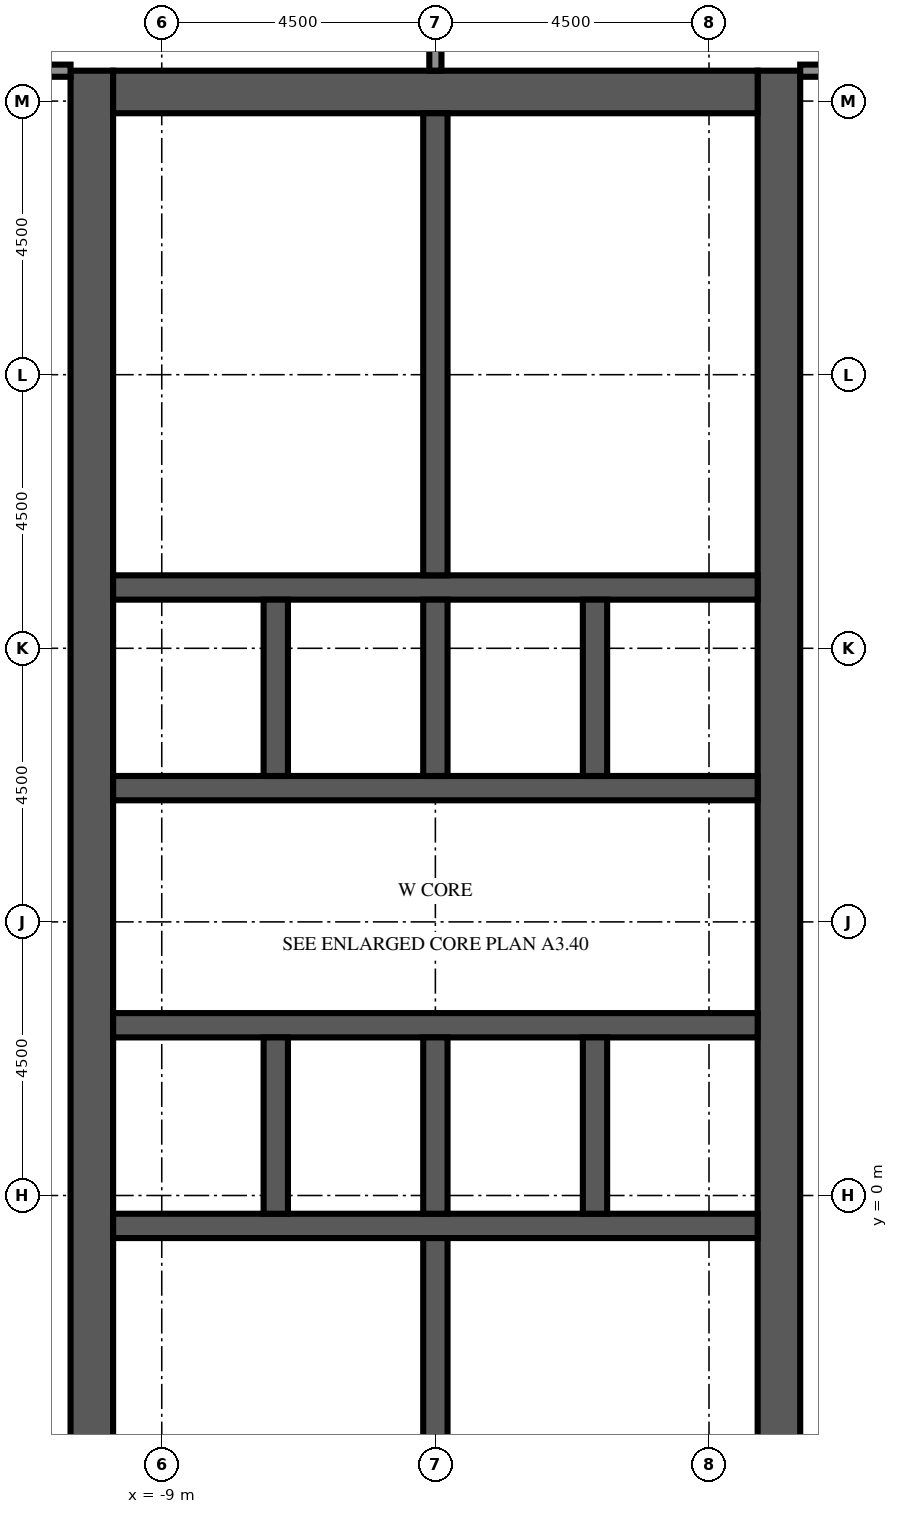
"""IFC4 building model, lengths in metres.
Left out: names, types, materials, properties, quantities, classifications, styles, units other than length and angle.
Written with IfcOpenShell. Run it as: python <this file> out.ifc"""

import sys

from ifc_helpers import new_model, si_unit, direction, frame, frame_2d, origin, place, context, subcontext, project, spatial, rectangle, extrude, element, fill, save


model = new_model("IFC4")
c1 = context("Model", 3, precision=1e-05, world=origin(), true_north=direction((0.0, 1.0)))
c2 = subcontext(c1, "Body", "Model", "MODEL_VIEW")
j1 = project(units=[si_unit("LENGTHUNIT", "METRE"), si_unit("PLANEANGLEUNIT", "RADIAN")], contexts=[c1])
p1 = place(None, origin())
s1 = spatial("IfcSite", under=j1, at=p1, CompositionType="ELEMENT")
p2 = place(p1, origin())
s2 = spatial("IfcBuilding", under=s1, at=p2, CompositionType="ELEMENT")
p3 = place(p2, frame((0.0, 0.0, 278.6)))
s3 = spatial("IfcBuildingStorey", under=s2, at=p3, CompositionType="ELEMENT", Elevation=278.6)
p4 = place(p3, frame((-10.15, -9.0, 0.0), z_axis=(0.0, 0.0, 1.0), x_axis=(0.0, 1.0, 0.0)))
e1 = element("IfcWall", 1, at=p4, inside=s3, PredefinedType="SHEAR", context=c2, shape_type="SweptSolid", body=[
    extrude(rectangle(XDim=27.5, YDim=0.7, at=frame_2d((13.75, 0.0))), origin(), (0.0, 0.0, 1.0), 4.1),
])
p5 = place(p4, frame((12.55, 0.0, 0.0)))
e2 = element("IfcOpeningElement", 2, at=p5, cuts=e1, PredefinedType="OPENING", context=c2, shape_type="SweptSolid", body=[
    extrude(rectangle(XDim=2.4, YDim=2.4, at=frame_2d((1.2, 1.2))), frame((0.0, 0.36, 0.0), z_axis=(0.0, -1.0, 0.0), x_axis=(1.0, 0.0, 0.0)), (0.0, 0.0, 1.0), 0.72),
])
p6 = place(p4, frame((6.825, 0.0, 0.0)))
e3 = element("IfcOpeningElement", 3, at=p6, cuts=e1, PredefinedType="OPENING", context=c2, shape_type="SweptSolid", body=[
    extrude(rectangle(XDim=1.2, YDim=2.1, at=frame_2d((0.6, 1.05))), frame((0.0, 0.36, 0.0), z_axis=(0.0, -1.0, 0.0), x_axis=(1.0, 0.0, 0.0)), (0.0, 0.0, 1.0), 0.72),
])
p7 = place(p4, frame((19.475, 0.0, 0.0)))
e4 = element("IfcOpeningElement", 4, at=p7, cuts=e1, PredefinedType="OPENING", context=c2, shape_type="SweptSolid", body=[
    extrude(rectangle(XDim=1.2, YDim=2.1, at=frame_2d((0.6, 1.05))), frame((0.0, 0.36, 0.0), z_axis=(0.0, -1.0, 0.0), x_axis=(1.0, 0.0, 0.0)), (0.0, 0.0, 1.0), 0.72),
])
p8 = place(p3, frame((1.15, -9.0, 0.0), z_axis=(0.0, 0.0, 1.0), x_axis=(0.0, 1.0, 0.0)))
e5 = element("IfcWall", 5, at=p8, inside=s3, PredefinedType="SHEAR", context=c2, shape_type="SweptSolid", body=[
    extrude(rectangle(XDim=27.5, YDim=0.7, at=frame_2d((13.75, 0.0))), origin(), (0.0, 0.0, 1.0), 4.1),
])
p9 = place(p8, frame((12.55, 0.0, 0.0)))
e6 = element("IfcOpeningElement", 6, at=p9, cuts=e5, PredefinedType="OPENING", context=c2, shape_type="SweptSolid", body=[
    extrude(rectangle(XDim=2.4, YDim=2.4, at=frame_2d((1.2, 1.2))), frame((0.0, 0.36, 0.0), z_axis=(0.0, -1.0, 0.0), x_axis=(1.0, 0.0, 0.0)), (0.0, 0.0, 1.0), 0.72),
])
p10 = place(p8, frame((3.9, 0.0, 0.0)))
e7 = element("IfcOpeningElement", 7, at=p10, cuts=e5, PredefinedType="OPENING", context=c2, shape_type="SweptSolid", body=[
    extrude(rectangle(XDim=1.2, YDim=2.1, at=frame_2d((0.6, 1.05))), frame((0.0, 0.36, 0.0), z_axis=(0.0, -1.0, 0.0), x_axis=(1.0, 0.0, 0.0)), (0.0, 0.0, 1.0), 0.72),
])
p11 = place(p8, frame((19.46, 0.0, 0.0)))
e8 = element("IfcOpeningElement", 8, at=p11, cuts=e5, PredefinedType="OPENING", context=c2, shape_type="SweptSolid", body=[
    extrude(rectangle(XDim=1.0, YDim=2.1, at=frame_2d((0.5, 1.05))), frame((0.0, 0.36, 0.0), z_axis=(0.0, -1.0, 0.0), x_axis=(1.0, 0.0, 0.0)), (0.0, 0.0, 1.0), 0.72),
])
p12 = place(p8, frame((21.17, 0.0, 0.0)))
e9 = element("IfcOpeningElement", 9, at=p12, cuts=e5, PredefinedType="OPENING", context=c2, shape_type="SweptSolid", body=[
    extrude(rectangle(XDim=1.0, YDim=2.1, at=frame_2d((0.5, 1.05))), frame((0.0, 0.36, 0.0), z_axis=(0.0, -1.0, 0.0), x_axis=(1.0, 0.0, 0.0)), (0.0, 0.0, 1.0), 0.72),
])
p13 = place(p8, frame((23.26, 0.0, 0.0)))
e10 = element("IfcOpeningElement", 10, at=p13, cuts=e5, PredefinedType="OPENING", context=c2, shape_type="SweptSolid", body=[
    extrude(rectangle(XDim=1.0, YDim=2.1, at=frame_2d((0.5, 1.05))), frame((0.0, 0.36, 0.0), z_axis=(0.0, -1.0, 0.0), x_axis=(1.0, 0.0, 0.0)), (0.0, 0.0, 1.0), 0.72),
])
p14 = place(p8, frame((25.35, 0.0, 0.0)))
e11 = element("IfcOpeningElement", 11, at=p14, cuts=e5, PredefinedType="OPENING", context=c2, shape_type="SweptSolid", body=[
    extrude(rectangle(XDim=1.0, YDim=2.1, at=frame_2d((0.5, 1.05))), frame((0.0, 0.36, 0.0), z_axis=(0.0, -1.0, 0.0), x_axis=(1.0, 0.0, 0.0)), (0.0, 0.0, 1.0), 0.72),
])
p15 = place(p3, frame((-9.8, 18.15, 0.0), z_axis=(0.0, 0.0, 1.0), x_axis=(1.0, 0.0, 0.0)))
e12 = element("IfcWall", 12, at=p15, inside=s3, PredefinedType="SHEAR", context=c2, shape_type="SweptSolid", body=[
    extrude(rectangle(XDim=10.6, YDim=0.7, at=frame_2d((5.3, 0.0))), origin(), (0.0, 0.0, 1.0), 4.1),
])
p16 = place(p3, frame((-9.8, -0.5, 0.0), z_axis=(0.0, 0.0, 1.0), x_axis=(1.0, 0.0, 0.0)))
e13 = element("IfcWall", 13, at=p16, inside=s3, PredefinedType="SHEAR", context=c2, shape_type="SweptSolid", body=[
    extrude(rectangle(XDim=10.6, YDim=0.4, at=frame_2d((5.3, 0.0))), origin(), (0.0, 0.0, 1.0), 4.1),
])
p17 = place(p3, frame((-9.8, 2.8, 0.0), z_axis=(0.0, 0.0, 1.0), x_axis=(1.0, 0.0, 0.0)))
e14 = element("IfcWall", 14, at=p17, inside=s3, PredefinedType="SHEAR", context=c2, shape_type="SweptSolid", body=[
    extrude(rectangle(XDim=10.6, YDim=0.4, at=frame_2d((5.3, 0.0))), origin(), (0.0, 0.0, 1.0), 4.1),
])
p18 = place(p17, frame((0.688, 0.0, 0.0)))
e15 = element("IfcOpeningElement", 15, at=p18, cuts=e14, PredefinedType="OPENING", context=c2, shape_type="SweptSolid", body=[
    extrude(rectangle(XDim=1.1, YDim=2.1, at=frame_2d((0.55, 1.05))), frame((0.0, 0.21, 0.0), z_axis=(0.0, -1.0, 0.0), x_axis=(1.0, 0.0, 0.0)), (0.0, 0.0, 1.0), 0.42),
])
p19 = place(p17, frame((3.438, 0.0, 0.0)))
e16 = element("IfcOpeningElement", 16, at=p19, cuts=e14, PredefinedType="OPENING", context=c2, shape_type="SweptSolid", body=[
    extrude(rectangle(XDim=1.1, YDim=2.1, at=frame_2d((0.55, 1.05))), frame((0.0, 0.21, 0.0), z_axis=(0.0, -1.0, 0.0), x_axis=(1.0, 0.0, 0.0)), (0.0, 0.0, 1.0), 0.42),
])
p20 = place(p17, frame((6.113, 0.0, 0.0)))
e17 = element("IfcOpeningElement", 17, at=p20, cuts=e14, PredefinedType="OPENING", context=c2, shape_type="SweptSolid", body=[
    extrude(rectangle(XDim=1.0, YDim=2.1, at=frame_2d((0.5, 1.05))), frame((0.0, 0.21, 0.0), z_axis=(0.0, -1.0, 0.0), x_axis=(1.0, 0.0, 0.0)), (0.0, 0.0, 1.0), 0.42),
])
p21 = place(p17, frame((8.863, 0.0, 0.0)))
e18 = element("IfcOpeningElement", 18, at=p21, cuts=e14, PredefinedType="OPENING", context=c2, shape_type="SweptSolid", body=[
    extrude(rectangle(XDim=1.0, YDim=2.1, at=frame_2d((0.5, 1.05))), frame((0.0, 0.21, 0.0), z_axis=(0.0, -1.0, 0.0), x_axis=(1.0, 0.0, 0.0)), (0.0, 0.0, 1.0), 0.42),
])
p22 = place(p3, frame((-9.8, 6.7, 0.0), z_axis=(0.0, 0.0, 1.0), x_axis=(1.0, 0.0, 0.0)))
e19 = element("IfcWall", 19, at=p22, inside=s3, PredefinedType="SHEAR", context=c2, shape_type="SweptSolid", body=[
    extrude(rectangle(XDim=10.6, YDim=0.4, at=frame_2d((5.3, 0.0))), origin(), (0.0, 0.0, 1.0), 4.1),
])
p23 = place(p22, frame((3.438, 0.0, 0.0)))
e20 = element("IfcOpeningElement", 20, at=p23, cuts=e19, PredefinedType="OPENING", context=c2, shape_type="SweptSolid", body=[
    extrude(rectangle(XDim=1.1, YDim=2.1, at=frame_2d((0.55, 1.05))), frame((0.0, 0.21, 0.0), z_axis=(0.0, -1.0, 0.0), x_axis=(1.0, 0.0, 0.0)), (0.0, 0.0, 1.0), 0.42),
])
p24 = place(p22, frame((6.062, 0.0, 0.0)))
e21 = element("IfcOpeningElement", 21, at=p24, cuts=e19, PredefinedType="OPENING", context=c2, shape_type="SweptSolid", body=[
    extrude(rectangle(XDim=1.1, YDim=2.1, at=frame_2d((0.55, 1.05))), frame((0.0, 0.21, 0.0), z_axis=(0.0, -1.0, 0.0), x_axis=(1.0, 0.0, 0.0)), (0.0, 0.0, 1.0), 0.42),
])
p25 = place(p22, frame((8.812, 0.0, 0.0)))
e22 = element("IfcOpeningElement", 22, at=p25, cuts=e19, PredefinedType="OPENING", context=c2, shape_type="SweptSolid", body=[
    extrude(rectangle(XDim=1.1, YDim=2.1, at=frame_2d((0.55, 1.05))), frame((0.0, 0.21, 0.0), z_axis=(0.0, -1.0, 0.0), x_axis=(1.0, 0.0, 0.0)), (0.0, 0.0, 1.0), 0.42),
])
p26 = place(p22, frame((0.738, 0.0, 0.0)))
e23 = element("IfcOpeningElement", 23, at=p26, cuts=e19, PredefinedType="OPENING", context=c2, shape_type="SweptSolid", body=[
    extrude(rectangle(XDim=1.0, YDim=2.1, at=frame_2d((0.5, 1.05))), frame((0.0, 0.21, 0.0), z_axis=(0.0, -1.0, 0.0), x_axis=(1.0, 0.0, 0.0)), (0.0, 0.0, 1.0), 0.42),
])
p27 = place(p3, frame((-9.8, 10.0, 0.0), z_axis=(0.0, 0.0, 1.0), x_axis=(1.0, 0.0, 0.0)))
e24 = element("IfcWall", 24, at=p27, inside=s3, PredefinedType="SHEAR", context=c2, shape_type="SweptSolid", body=[
    extrude(rectangle(XDim=10.6, YDim=0.4, at=frame_2d((5.3, 0.0))), origin(), (0.0, 0.0, 1.0), 4.1),
])
for number, where, z_axis, x_axis in (
    (25, (-7.125, -0.3, 0.0), (0.0, 0.0, 1.0), (0.0, 1.0, 0.0)),
    (26, (-7.125, 6.9, 0.0), (0.0, 0.0, 1.0), (0.0, 1.0, 0.0)),
    (27, (-4.5, -0.3, 0.0), (0.0, 0.0, 1.0), (0.0, 1.0, 0.0)),
    (28, (-4.5, 6.9, 0.0), (0.0, 0.0, 1.0), (0.0, 1.0, 0.0)),
    (29, (-1.875, -0.3, 0.0), (0.0, 0.0, 1.0), (0.0, 1.0, 0.0)),
    (30, (-1.875, 6.9, 0.0), (0.0, 0.0, 1.0), (0.0, 1.0, 0.0)),
):
    element("IfcWall", number, at=place(p3, frame(where, z_axis=z_axis, x_axis=x_axis)), inside=s3, PredefinedType="SHEAR", context=c2, shape_type="SweptSolid", body=[
        extrude(rectangle(XDim=2.9, YDim=0.4, at=frame_2d((1.45, 0.0))), origin(), (0.0, 0.0, 1.0), 4.1),
    ])
for number, where, z_axis, x_axis in (
    (31, (-4.5, -8.3, 0.0), (0.0, 0.0, 1.0), (0.0, 1.0, 0.0)),
    (32, (-4.5, 10.2, 0.0), (0.0, 0.0, 1.0), (0.0, 1.0, 0.0)),
):
    element("IfcWall", number, at=place(p3, frame(where, z_axis=z_axis, x_axis=x_axis)), inside=s3, PredefinedType="SHEAR", context=c2, shape_type="SweptSolid", body=[
        extrude(rectangle(XDim=7.6, YDim=0.4, at=frame_2d((3.8, 0.0))), origin(), (0.0, 0.0, 1.0), 4.1),
    ])
p28 = place(p3, frame((-0.8, -2.98, 0.0), z_axis=(0.0, 0.0, 1.0), x_axis=(1.0, 0.0, 0.0)))
e33 = element("IfcWall", 33, at=p28, inside=s3, PredefinedType="PARTITIONING", context=c2, shape_type="SweptSolid", body=[
    extrude(rectangle(XDim=1.6, YDim=0.1, at=frame_2d((0.8, 0.0))), origin(), (0.0, 0.0, 1.0), 3.65),
])
p29 = place(p28, frame((0.3, 0.0, 0.0)))
e34 = element("IfcOpeningElement", 34, at=p29, cuts=e33, PredefinedType="OPENING", context=c2, shape_type="SweptSolid", body=[
    extrude(rectangle(XDim=1.0, YDim=2.1, at=frame_2d((0.5, 1.05))), frame((0.0, 0.06, 0.0), z_axis=(0.0, -1.0, 0.0), x_axis=(1.0, 0.0, 0.0)), (0.0, 0.0, 1.0), 0.12),
])
p30 = place(p3, frame((-0.8, -6.02, 0.0), z_axis=(0.0, 0.0, 1.0), x_axis=(0.0, 1.0, 0.0)))
e35 = element("IfcWall", 35, at=p30, inside=s3, PredefinedType="PARTITIONING", context=c2, shape_type="SweptSolid", body=[
    extrude(rectangle(XDim=3.04, YDim=0.1, at=frame_2d((1.52, 0.0))), origin(), (0.0, 0.0, 1.0), 3.65),
])
p31 = place(p30, frame((1.02, 0.0, 0.0)))
e36 = element("IfcOpeningElement", 36, at=p31, cuts=e35, PredefinedType="OPENING", context=c2, shape_type="SweptSolid", body=[
    extrude(rectangle(XDim=1.0, YDim=2.1, at=frame_2d((0.5, 1.05))), frame((0.0, 0.06, 0.0), z_axis=(0.0, -1.0, 0.0), x_axis=(1.0, 0.0, 0.0)), (0.0, 0.0, 1.0), 0.12),
])
p32 = place(p3, frame((-4.3, -2.98, 0.0), z_axis=(0.0, 0.0, 1.0), x_axis=(1.0, 0.0, 0.0)))
e37 = element("IfcWall", 37, at=p32, inside=s3, PredefinedType="PARTITIONING", context=c2, shape_type="SweptSolid", body=[
    extrude(rectangle(XDim=3.5, YDim=0.1, at=frame_2d((1.75, 0.0))), origin(), (0.0, 0.0, 1.0), 3.65),
])
for number, where, z_axis, x_axis in (
    (38, (-4.3, 11.72, 0.0), (0.0, 0.0, 1.0), (1.0, 0.0, 0.0)),
    (39, (-4.3, 13.62, 0.0), (0.0, 0.0, 1.0), (1.0, 0.0, 0.0)),
    (40, (-4.3, 15.9, 0.0), (0.0, 0.0, 1.0), (1.0, 0.0, 0.0)),
):
    element("IfcWall", number, at=place(p3, frame(where, z_axis=z_axis, x_axis=x_axis)), inside=s3, PredefinedType="PARTITIONING", context=c2, shape_type="SweptSolid", body=[
        extrude(rectangle(XDim=5.1, YDim=0.1, at=frame_2d((2.55, 0.0))), origin(), (0.0, 0.0, 1.0), 3.65),
    ])
p33 = place(p3, frame((-4.5, 18.5, 0.0), z_axis=(0.0, 0.0, 1.0), x_axis=(0.0, 1.0, 0.0)))
e41 = element("IfcWall", 41, at=p33, inside=s3, PredefinedType="PARTITIONING", context=c2, shape_type="SweptSolid", body=[
    extrude(rectangle(XDim=8.1, YDim=0.2, at=frame_2d((4.05, 0.0))), origin(), (0.0, 0.0, 1.0), 3.65),
])
p34 = place(p3, frame((-13.5, 18.5, 0.0), z_axis=(0.0, 0.0, 1.0), x_axis=(1.0, 0.0, 0.0)))
e42 = element("IfcWall", 42, at=p34, inside=s3, PredefinedType="PARTITIONING", context=c2, shape_type="SweptSolid", body=[
    extrude(rectangle(XDim=3.0, YDim=0.2, at=frame_2d((1.5, 0.0))), origin(), (0.0, 0.0, 1.0), 3.65),
])
p35 = place(p34, frame((0.85, 0.0, 0.0)))
e43 = element("IfcOpeningElement", 43, at=p35, cuts=e42, PredefinedType="OPENING", context=c2, shape_type="SweptSolid", body=[
    extrude(rectangle(XDim=1.0, YDim=2.1, at=frame_2d((0.5, 1.05))), frame((0.0, 0.11, 0.0), z_axis=(0.0, -1.0, 0.0), x_axis=(1.0, 0.0, 0.0)), (0.0, 0.0, 1.0), 0.22),
])
p36 = place(p3, frame((1.5, 18.5, 0.0), z_axis=(0.0, 0.0, 1.0), x_axis=(1.0, 0.0, 0.0)))
e44 = element("IfcWall", 44, at=p36, inside=s3, PredefinedType="PARTITIONING", context=c2, shape_type="SweptSolid", body=[
    extrude(rectangle(XDim=4.5, YDim=0.2, at=frame_2d((2.25, 0.0))), origin(), (0.0, 0.0, 1.0), 3.65),
])
p37 = place(p36, frame((1.1, 0.0, 0.0)))
e45 = element("IfcOpeningElement", 45, at=p37, cuts=e44, PredefinedType="OPENING", context=c2, shape_type="SweptSolid", body=[
    extrude(rectangle(XDim=1.0, YDim=2.1, at=frame_2d((0.5, 1.05))), frame((0.0, 0.11, 0.0), z_axis=(0.0, -1.0, 0.0), x_axis=(1.0, 0.0, 0.0)), (0.0, 0.0, 1.0), 0.22),
])
p38 = place(p18, origin())
e46 = element("IfcDoor", 46, at=p38, inside=s3, OperationType="DOUBLE_DOOR_SLIDING", PredefinedType="DOOR", context=c2, shape_type="SweptSolid", body=[
    extrude(rectangle(XDim=1.1, YDim=2.1, at=frame_2d((0.55, 1.05))), frame((0.0, 0.025, 0.0), z_axis=(0.0, -1.0, 0.0), x_axis=(1.0, 0.0, 0.0)), (0.0, 0.0, 1.0), 0.05),
])
fill(e15, e46)
p39 = place(p19, origin())
e47 = element("IfcDoor", 47, at=p39, inside=s3, OperationType="DOUBLE_DOOR_SLIDING", PredefinedType="DOOR", context=c2, shape_type="SweptSolid", body=[
    extrude(rectangle(XDim=1.1, YDim=2.1, at=frame_2d((0.55, 1.05))), frame((0.0, 0.025, 0.0), z_axis=(0.0, -1.0, 0.0), x_axis=(1.0, 0.0, 0.0)), (0.0, 0.0, 1.0), 0.05),
])
fill(e16, e47)
p40 = place(p23, origin())
e48 = element("IfcDoor", 48, at=p40, inside=s3, OperationType="DOUBLE_DOOR_SLIDING", PredefinedType="DOOR", context=c2, shape_type="SweptSolid", body=[
    extrude(rectangle(XDim=1.1, YDim=2.1, at=frame_2d((0.55, 1.05))), frame((0.0, 0.025, 0.0), z_axis=(0.0, -1.0, 0.0), x_axis=(1.0, 0.0, 0.0)), (0.0, 0.0, 1.0), 0.05),
])
fill(e20, e48)
p41 = place(p24, origin())
e49 = element("IfcDoor", 49, at=p41, inside=s3, OperationType="DOUBLE_DOOR_SLIDING", PredefinedType="DOOR", context=c2, shape_type="SweptSolid", body=[
    extrude(rectangle(XDim=1.1, YDim=2.1, at=frame_2d((0.55, 1.05))), frame((0.0, 0.025, 0.0), z_axis=(0.0, -1.0, 0.0), x_axis=(1.0, 0.0, 0.0)), (0.0, 0.0, 1.0), 0.05),
])
fill(e21, e49)
p42 = place(p25, origin())
e50 = element("IfcDoor", 50, at=p42, inside=s3, OperationType="DOUBLE_DOOR_SLIDING", PredefinedType="DOOR", context=c2, shape_type="SweptSolid", body=[
    extrude(rectangle(XDim=1.1, YDim=2.1, at=frame_2d((0.55, 1.05))), frame((0.0, 0.025, 0.0), z_axis=(0.0, -1.0, 0.0), x_axis=(1.0, 0.0, 0.0)), (0.0, 0.0, 1.0), 0.05),
])
fill(e22, e50)
p43 = place(p5, origin())
e51 = element("IfcDoor", 51, at=p43, inside=s3, OperationType="DOUBLE_DOOR_DOUBLE_SWING", PredefinedType="DOOR", context=c2, shape_type="SweptSolid", body=[
    extrude(rectangle(XDim=2.4, YDim=2.4, at=frame_2d((1.2, 1.2))), frame((0.0, 0.025, 0.0), z_axis=(0.0, -1.0, 0.0), x_axis=(1.0, 0.0, 0.0)), (0.0, 0.0, 1.0), 0.05),
])
fill(e2, e51)
p44 = place(p9, origin())
e52 = element("IfcDoor", 52, at=p44, inside=s3, OperationType="DOUBLE_DOOR_DOUBLE_SWING", PredefinedType="DOOR", context=c2, shape_type="SweptSolid", body=[
    extrude(rectangle(XDim=2.4, YDim=2.4, at=frame_2d((1.2, 1.2))), frame((0.0, 0.025, 0.0), z_axis=(0.0, -1.0, 0.0), x_axis=(1.0, 0.0, 0.0)), (0.0, 0.0, 1.0), 0.05),
])
fill(e6, e52)
p45 = place(p6, origin())
e53 = element("IfcDoor", 53, at=p45, inside=s3, OperationType="SINGLE_SWING_LEFT", PredefinedType="DOOR", context=c2, shape_type="SweptSolid", body=[
    extrude(rectangle(XDim=1.2, YDim=2.1, at=frame_2d((0.6, 1.05))), frame((0.0, 0.025, 0.0), z_axis=(0.0, -1.0, 0.0), x_axis=(1.0, 0.0, 0.0)), (0.0, 0.0, 1.0), 0.05),
])
fill(e3, e53)
p46 = place(p7, origin())
e54 = element("IfcDoor", 54, at=p46, inside=s3, OperationType="SINGLE_SWING_LEFT", PredefinedType="DOOR", context=c2, shape_type="SweptSolid", body=[
    extrude(rectangle(XDim=1.2, YDim=2.1, at=frame_2d((0.6, 1.05))), frame((0.0, 0.025, 0.0), z_axis=(0.0, -1.0, 0.0), x_axis=(1.0, 0.0, 0.0)), (0.0, 0.0, 1.0), 0.05),
])
fill(e4, e54)
p47 = place(p20, origin())
e55 = element("IfcDoor", 55, at=p47, inside=s3, OperationType="SINGLE_SWING_LEFT", PredefinedType="DOOR", context=c2, shape_type="SweptSolid", body=[
    extrude(rectangle(XDim=1.0, YDim=2.1, at=frame_2d((0.5, 1.05))), frame((0.0, 0.025, 0.0), z_axis=(0.0, -1.0, 0.0), x_axis=(1.0, 0.0, 0.0)), (0.0, 0.0, 1.0), 0.05),
])
fill(e17, e55)
p48 = place(p21, origin())
e56 = element("IfcDoor", 56, at=p48, inside=s3, OperationType="SINGLE_SWING_RIGHT", PredefinedType="DOOR", context=c2, shape_type="SweptSolid", body=[
    extrude(rectangle(XDim=1.0, YDim=2.1, at=frame_2d((0.5, 1.05))), frame((0.0, 0.025, 0.0), z_axis=(0.0, -1.0, 0.0), x_axis=(1.0, 0.0, 0.0)), (0.0, 0.0, 1.0), 0.05),
])
fill(e18, e56)
p49 = place(p26, origin())
e57 = element("IfcDoor", 57, at=p49, inside=s3, OperationType="SINGLE_SWING_LEFT", PredefinedType="DOOR", context=c2, shape_type="SweptSolid", body=[
    extrude(rectangle(XDim=1.0, YDim=2.1, at=frame_2d((0.5, 1.05))), frame((0.0, 0.025, 0.0), z_axis=(0.0, -1.0, 0.0), x_axis=(1.0, 0.0, 0.0)), (0.0, 0.0, 1.0), 0.05),
])
fill(e23, e57)
p50 = place(p10, origin())
e58 = element("IfcDoor", 58, at=p50, inside=s3, OperationType="SINGLE_SWING_LEFT", PredefinedType="DOOR", context=c2, shape_type="SweptSolid", body=[
    extrude(rectangle(XDim=1.2, YDim=2.1, at=frame_2d((0.6, 1.05))), frame((0.0, 0.325, 0.0), z_axis=(0.0, -1.0, 0.0), x_axis=(1.0, 0.0, 0.0)), (0.0, 0.0, 1.0), 0.05),
])
fill(e7, e58)
p51 = place(p29, origin())
e59 = element("IfcDoor", 59, at=p51, inside=s3, OperationType="SINGLE_SWING_LEFT", PredefinedType="DOOR", context=c2, shape_type="SweptSolid", body=[
    extrude(rectangle(XDim=1.0, YDim=2.1, at=frame_2d((0.5, 1.05))), frame((0.0, 0.025, 0.0), z_axis=(0.0, -1.0, 0.0), x_axis=(1.0, 0.0, 0.0)), (0.0, 0.0, 1.0), 0.05),
])
fill(e34, e59)
p52 = place(p11, origin())
e60 = element("IfcDoor", 60, at=p52, inside=s3, OperationType="SINGLE_SWING_LEFT", PredefinedType="DOOR", context=c2, shape_type="SweptSolid", body=[
    extrude(rectangle(XDim=1.0, YDim=2.1, at=frame_2d((0.5, 1.05))), frame((0.0, 0.325, 0.0), z_axis=(0.0, -1.0, 0.0), x_axis=(1.0, 0.0, 0.0)), (0.0, 0.0, 1.0), 0.05),
])
fill(e8, e60)
p53 = place(p12, origin())
e61 = element("IfcDoor", 61, at=p53, inside=s3, OperationType="SINGLE_SWING_RIGHT", PredefinedType="DOOR", context=c2, shape_type="SweptSolid", body=[
    extrude(rectangle(XDim=1.0, YDim=2.1, at=frame_2d((0.5, 1.05))), frame((0.0, 0.325, 0.0), z_axis=(0.0, -1.0, 0.0), x_axis=(1.0, 0.0, 0.0)), (0.0, 0.0, 1.0), 0.05),
])
fill(e9, e61)
p54 = place(p13, origin())
e62 = element("IfcDoor", 62, at=p54, inside=s3, OperationType="SINGLE_SWING_LEFT", PredefinedType="DOOR", context=c2, shape_type="SweptSolid", body=[
    extrude(rectangle(XDim=1.0, YDim=2.1, at=frame_2d((0.5, 1.05))), frame((0.0, 0.325, 0.0), z_axis=(0.0, -1.0, 0.0), x_axis=(1.0, 0.0, 0.0)), (0.0, 0.0, 1.0), 0.05),
])
fill(e10, e62)
p55 = place(p14, origin())
e63 = element("IfcDoor", 63, at=p55, inside=s3, OperationType="SINGLE_SWING_RIGHT", PredefinedType="DOOR", context=c2, shape_type="SweptSolid", body=[
    extrude(rectangle(XDim=1.0, YDim=2.1, at=frame_2d((0.5, 1.05))), frame((0.0, 0.325, 0.0), z_axis=(0.0, -1.0, 0.0), x_axis=(1.0, 0.0, 0.0)), (0.0, 0.0, 1.0), 0.05),
])
fill(e11, e63)
save(model, sys.argv[1])
